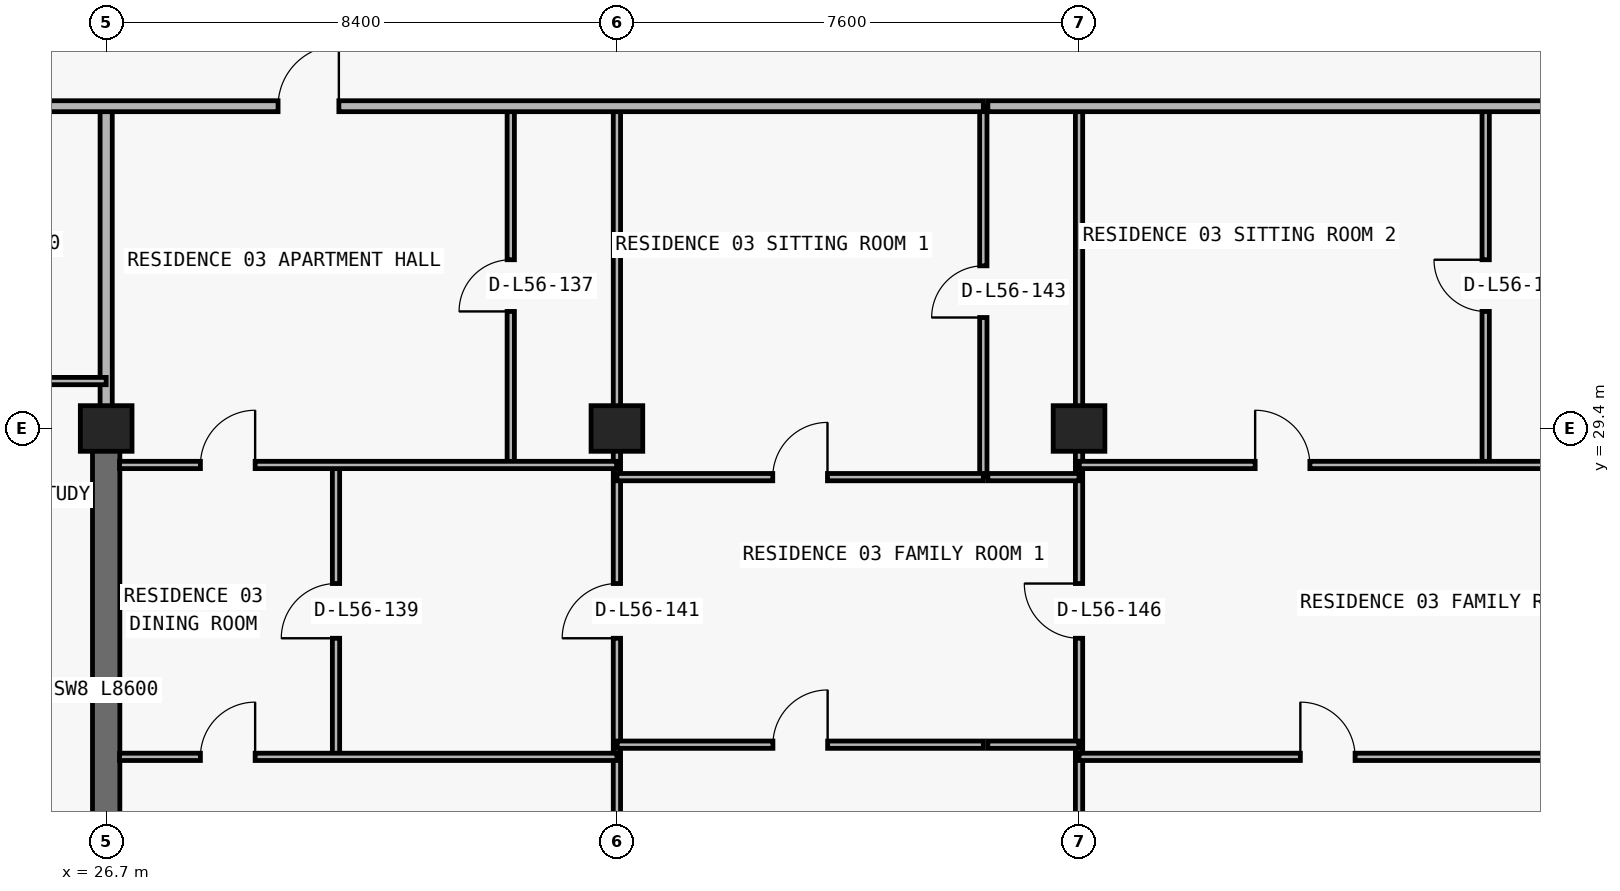
"""IFC4 building model, lengths in metres.
Left out: names, types, materials, properties, quantities, classifications, styles, units other than length and angle.
Written with IfcOpenShell. Run it as: python <this file> out.ifc"""

import sys

from ifc_helpers import new_model, si_unit, direction, frame, frame_2d, origin, origin_2d, place, context, subcontext, project, spatial, rectangle, extrude, element, fill, save


model = new_model("IFC4")
c1 = context("Model", 3, precision=1e-05, world=origin(), true_north=direction((0.0, 1.0)))
c2 = subcontext(c1, "Body", "Model", "MODEL_VIEW")
j1 = project(units=[si_unit("LENGTHUNIT", "METRE"), si_unit("PLANEANGLEUNIT", "RADIAN")], contexts=[c1])
p1 = place(None, origin())
s1 = spatial("IfcSite", under=j1, at=p1, CompositionType="ELEMENT")
p2 = place(p1, origin())
s2 = spatial("IfcBuilding", under=s1, at=p2, CompositionType="ELEMENT")
p3 = place(p2, frame((0.0, 0.0, 201.6)))
s3 = spatial("IfcBuildingStorey", under=s2, at=p3, CompositionType="ELEMENT", Elevation=201.6)
for number, where, z_axis, x_axis in (
    (1, (26.7, 29.4, 0.0), (0.0, 0.0, 1.0), (1.0, 0.0, 0.0)),
    (2, (35.1, 29.4, 0.0), (0.0, 0.0, 1.0), (1.0, 0.0, 0.0)),
    (3, (42.7, 29.4, 0.0), (0.0, 0.0, 1.0), (1.0, 0.0, 0.0)),
):
    element("IfcColumn", number, at=place(p3, frame(where, z_axis=z_axis, x_axis=x_axis)), inside=s3, PredefinedType="COLUMN", context=c2, shape_type="SweptSolid", body=[
        extrude(rectangle(XDim=0.85, YDim=0.75, at=origin_2d()), origin(), (0.0, 0.0, 1.0), 3.05),
    ])
p4 = place(p3, frame((26.7, 20.8, 0.0), z_axis=(0.0, 0.0, 1.0), x_axis=(0.0, 1.0, 0.0)))
e4 = element("IfcWall", 4, at=p4, inside=s3, PredefinedType="SHEAR", context=c2, shape_type="SweptSolid", body=[
    extrude(rectangle(XDim=8.6, YDim=0.45, at=frame_2d((4.3, 0.0))), origin(), (0.0, 0.0, 1.0), 3.05),
])
p5 = place(p3, frame((26.7, 29.405, 0.0), z_axis=(0.0, 0.0, 1.0), x_axis=(0.0, 1.0, 0.0)))
e5 = element("IfcWall", 5, at=p5, inside=s3, PredefinedType="PARTITIONING", context=c2, shape_type="SweptSolid", body=[
    extrude(rectangle(XDim=5.295, YDim=0.2, at=frame_2d((2.647, 0.0))), origin(), (0.0, 0.0, 1.0), 2.335),
])
p6 = place(p3, frame((30.48, 24.0, 0.0), z_axis=(0.0, 0.0, 1.0), x_axis=(0.0, 1.0, 0.0)))
e6 = element("IfcWall", 6, at=p6, inside=s3, PredefinedType="PARTITIONING", context=c2, shape_type="SweptSolid", body=[
    extrude(rectangle(XDim=4.8, YDim=0.12, at=frame_2d((2.4, 0.0))), origin(), (0.0, 0.0, 1.0), 3.05),
])
p7 = place(p6, frame((1.95, 0.0, 0.0)))
e7 = element("IfcOpeningElement", 7, at=p7, cuts=e6, PredefinedType="OPENING", context=c2, shape_type="SweptSolid", body=[
    extrude(rectangle(XDim=0.9, YDim=2.15, at=frame_2d((0.45, 1.075))), frame((0.0, 0.07, 0.0), z_axis=(0.0, -1.0, 0.0), x_axis=(1.0, 0.0, 0.0)), (0.0, 0.0, 1.0), 0.14),
])
p8 = place(p3, frame((33.354, 28.8, 0.0), z_axis=(0.0, 0.0, 1.0), x_axis=(0.0, 1.0, 0.0)))
e8 = element("IfcWall", 8, at=p8, inside=s3, PredefinedType="PARTITIONING", context=c2, shape_type="SweptSolid", body=[
    extrude(rectangle(XDim=5.9, YDim=0.12, at=frame_2d((2.95, 0.0))), origin(), (0.0, 0.0, 1.0), 3.05),
])
p9 = place(p8, frame((2.525, 0.0, 0.0)))
e9 = element("IfcOpeningElement", 9, at=p9, cuts=e8, PredefinedType="OPENING", context=c2, shape_type="SweptSolid", body=[
    extrude(rectangle(XDim=0.85, YDim=2.1, at=frame_2d((0.425, 1.05))), frame((0.0, 0.07, 0.0), z_axis=(0.0, -1.0, 0.0), x_axis=(1.0, 0.0, 0.0)), (0.0, 0.0, 1.0), 0.14),
])
p10 = place(p3, frame((35.1, 11.24, 0.0), z_axis=(0.0, 0.0, 1.0), x_axis=(0.0, 1.0, 0.0)))
e10 = element("IfcWall", 10, at=p10, inside=s3, PredefinedType="PARTITIONING", context=c2, shape_type="SweptSolid", body=[
    extrude(rectangle(XDim=23.46, YDim=0.12, at=frame_2d((11.73, 0.0))), origin(), (0.0, 0.0, 1.0), 2.263),
])
p11 = place(p10, frame((14.71, 0.0, 0.0)))
e11 = element("IfcOpeningElement", 11, at=p11, cuts=e10, PredefinedType="OPENING", context=c2, shape_type="SweptSolid", body=[
    extrude(rectangle(XDim=0.9, YDim=2.15, at=frame_2d((0.45, 1.075))), frame((0.0, 0.07, 0.0), z_axis=(0.0, -1.0, 0.0), x_axis=(1.0, 0.0, 0.0)), (0.0, 0.0, 1.0), 0.14),
])
p12 = place(p3, frame((41.126, 28.6, 0.0), z_axis=(0.0, 0.0, 1.0), x_axis=(0.0, 1.0, 0.0)))
e12 = element("IfcWall", 12, at=p12, inside=s3, PredefinedType="PARTITIONING", context=c2, shape_type="SweptSolid", body=[
    extrude(rectangle(XDim=6.1, YDim=0.12, at=frame_2d((3.05, 0.0))), origin(), (0.0, 0.0, 1.0), 3.05),
])
p13 = place(p12, frame((2.625, 0.0, 0.0)))
e13 = element("IfcOpeningElement", 13, at=p13, cuts=e12, PredefinedType="OPENING", context=c2, shape_type="SweptSolid", body=[
    extrude(rectangle(XDim=0.85, YDim=2.1, at=frame_2d((0.425, 1.05))), frame((0.0, 0.07, 0.0), z_axis=(0.0, -1.0, 0.0), x_axis=(1.0, 0.0, 0.0)), (0.0, 0.0, 1.0), 0.14),
])
p14 = place(p3, frame((42.7, 11.24, 0.0), z_axis=(0.0, 0.0, 1.0), x_axis=(0.0, 1.0, 0.0)))
e14 = element("IfcWall", 14, at=p14, inside=s3, PredefinedType="PARTITIONING", context=c2, shape_type="SweptSolid", body=[
    extrude(rectangle(XDim=23.46, YDim=0.12, at=frame_2d((11.73, 0.0))), origin(), (0.0, 0.0, 1.0), 2.263),
])
p15 = place(p14, frame((14.71, 0.0, 0.0)))
e15 = element("IfcOpeningElement", 15, at=p15, cuts=e14, PredefinedType="OPENING", context=c2, shape_type="SweptSolid", body=[
    extrude(rectangle(XDim=0.9, YDim=2.15, at=frame_2d((0.45, 1.075))), frame((0.0, 0.07, 0.0), z_axis=(0.0, -1.0, 0.0), x_axis=(1.0, 0.0, 0.0)), (0.0, 0.0, 1.0), 0.14),
])
p16 = place(p3, frame((49.388, 28.8, 0.0), z_axis=(0.0, 0.0, 1.0), x_axis=(0.0, 1.0, 0.0)))
e16 = element("IfcWall", 16, at=p16, inside=s3, PredefinedType="PARTITIONING", context=c2, shape_type="SweptSolid", body=[
    extrude(rectangle(XDim=5.9, YDim=0.12, at=frame_2d((2.95, 0.0))), origin(), (0.0, 0.0, 1.0), 3.05),
])
p17 = place(p16, frame((2.525, 0.0, 0.0)))
e17 = element("IfcOpeningElement", 17, at=p17, cuts=e16, PredefinedType="OPENING", context=c2, shape_type="SweptSolid", body=[
    extrude(rectangle(XDim=0.85, YDim=2.1, at=frame_2d((0.425, 1.05))), frame((0.0, 0.07, 0.0), z_axis=(0.0, -1.0, 0.0), x_axis=(1.0, 0.0, 0.0)), (0.0, 0.0, 1.0), 0.14),
])
p18 = place(p3, frame((26.92, 24.0, 0.0), z_axis=(0.0, 0.0, 1.0), x_axis=(1.0, 0.0, 0.0)))
e18 = element("IfcWall", 18, at=p18, inside=s3, PredefinedType="PARTITIONING", context=c2, shape_type="SweptSolid", body=[
    extrude(rectangle(XDim=8.18, YDim=0.12, at=frame_2d((4.09, 0.0))), origin(), (0.0, 0.0, 1.0), 3.05),
])
p19 = place(p18, frame((1.33, 0.0, 0.0)))
e19 = element("IfcOpeningElement", 19, at=p19, cuts=e18, PredefinedType="OPENING", context=c2, shape_type="SweptSolid", body=[
    extrude(rectangle(XDim=0.9, YDim=2.15, at=frame_2d((0.45, 1.075))), frame((0.0, 0.07, 0.0), z_axis=(0.0, -1.0, 0.0), x_axis=(1.0, 0.0, 0.0)), (0.0, 0.0, 1.0), 0.14),
])
p20 = place(p3, frame((42.7, 24.0, 0.0), z_axis=(0.0, 0.0, 1.0), x_axis=(1.0, 0.0, 0.0)))
e20 = element("IfcWall", 20, at=p20, inside=s3, PredefinedType="PARTITIONING", context=c2, shape_type="SweptSolid", body=[
    extrude(rectangle(XDim=8.18, YDim=0.12, at=frame_2d((4.09, 0.0))), origin(), (0.0, 0.0, 1.0), 3.05),
])
p21 = place(p20, frame((3.64, 0.0, 0.0)))
e21 = element("IfcOpeningElement", 21, at=p21, cuts=e20, PredefinedType="OPENING", context=c2, shape_type="SweptSolid", body=[
    extrude(rectangle(XDim=0.9, YDim=2.15, at=frame_2d((0.45, 1.075))), frame((0.0, 0.07, 0.0), z_axis=(0.0, -1.0, 0.0), x_axis=(1.0, 0.0, 0.0)), (0.0, 0.0, 1.0), 0.14),
])
p22 = place(p3, frame((35.105, 24.2, 0.0), z_axis=(0.0, 0.0, 1.0), x_axis=(1.0, 0.0, 0.0)))
e22 = element("IfcWall", 22, at=p22, inside=s3, PredefinedType="PARTITIONING", context=c2, shape_type="SweptSolid", body=[
    extrude(rectangle(XDim=6.021, YDim=0.12, at=frame_2d((3.01, 0.0))), origin(), (0.0, 0.0, 1.0), 3.05),
])
p23 = place(p22, frame((2.561, 0.0, 0.0)))
e23 = element("IfcOpeningElement", 23, at=p23, cuts=e22, PredefinedType="OPENING", context=c2, shape_type="SweptSolid", body=[
    extrude(rectangle(XDim=0.9, YDim=2.15, at=frame_2d((0.45, 1.075))), frame((0.0, 0.07, 0.0), z_axis=(0.0, -1.0, 0.0), x_axis=(1.0, 0.0, 0.0)), (0.0, 0.0, 1.0), 0.14),
])
p24 = place(p3, frame((41.2, 24.2, 0.0), z_axis=(0.0, 0.0, 1.0), x_axis=(1.0, 0.0, 0.0)))
e24 = element("IfcWall", 24, at=p24, inside=s3, PredefinedType="PARTITIONING", context=c2, shape_type="SweptSolid", body=[
    extrude(rectangle(XDim=1.495, YDim=0.12, at=frame_2d((0.748, 0.0))), origin(), (0.0, 0.0, 1.0), 3.05),
])
p25 = place(p3, frame((18.3, 25.03, 0.0), z_axis=(0.0, 0.0, 1.0), x_axis=(1.0, 0.0, 0.0)))
e25 = element("IfcWall", 25, at=p25, inside=s3, PredefinedType="PARTITIONING", context=c2, shape_type="SweptSolid", body=[
    extrude(rectangle(XDim=8.18, YDim=0.12, at=frame_2d((4.09, 0.0))), origin(), (0.0, 0.0, 1.0), 3.05),
])
p26 = place(p25, frame((1.693, 0.0, 0.0)))
e26 = element("IfcOpeningElement", 26, at=p26, cuts=e25, PredefinedType="OPENING", context=c2, shape_type="SweptSolid", body=[
    extrude(rectangle(XDim=0.9, YDim=2.15, at=frame_2d((0.45, 1.075))), frame((0.0, 0.07, 0.0), z_axis=(0.0, -1.0, 0.0), x_axis=(1.0, 0.0, 0.0)), (0.0, 0.0, 1.0), 0.14),
])
p27 = place(p25, frame((5.95, 0.0, 0.0)))
e27 = element("IfcOpeningElement", 27, at=p27, cuts=e25, PredefinedType="OPENING", context=c2, shape_type="SweptSolid", body=[
    extrude(rectangle(XDim=0.9, YDim=2.15, at=frame_2d((0.45, 1.075))), frame((0.0, 0.07, 0.0), z_axis=(0.0, -1.0, 0.0), x_axis=(1.0, 0.0, 0.0)), (0.0, 0.0, 1.0), 0.14),
])
p28 = place(p3, frame((35.1, 28.6, 0.0), z_axis=(0.0, 0.0, 1.0), x_axis=(1.0, 0.0, 0.0)))
e28 = element("IfcWall", 28, at=p28, inside=s3, PredefinedType="PARTITIONING", context=c2, shape_type="SweptSolid", body=[
    extrude(rectangle(XDim=6.026, YDim=0.12, at=frame_2d((3.013, 0.0))), origin(), (0.0, 0.0, 1.0), 3.05),
])
p29 = place(p28, frame((2.563, 0.0, 0.0)))
e29 = element("IfcOpeningElement", 29, at=p29, cuts=e28, PredefinedType="OPENING", context=c2, shape_type="SweptSolid", body=[
    extrude(rectangle(XDim=0.9, YDim=2.15, at=frame_2d((0.45, 1.075))), frame((0.0, 0.07, 0.0), z_axis=(0.0, -1.0, 0.0), x_axis=(1.0, 0.0, 0.0)), (0.0, 0.0, 1.0), 0.14),
])
p30 = place(p3, frame((41.2, 28.6, 0.0), z_axis=(0.0, 0.0, 1.0), x_axis=(1.0, 0.0, 0.0)))
e30 = element("IfcWall", 30, at=p30, inside=s3, PredefinedType="PARTITIONING", context=c2, shape_type="SweptSolid", body=[
    extrude(rectangle(XDim=1.5, YDim=0.12, at=frame_2d((0.75, 0.0))), origin(), (0.0, 0.0, 1.0), 3.05),
])
p31 = place(p3, frame((26.92, 28.8, 0.0), z_axis=(0.0, 0.0, 1.0), x_axis=(1.0, 0.0, 0.0)))
e31 = element("IfcWall", 31, at=p31, inside=s3, PredefinedType="PARTITIONING", context=c2, shape_type="SweptSolid", body=[
    extrude(rectangle(XDim=8.175, YDim=0.12, at=frame_2d((4.087, 0.0))), origin(), (0.0, 0.0, 1.0), 3.05),
])
p32 = place(p31, frame((1.33, 0.0, 0.0)))
e32 = element("IfcOpeningElement", 32, at=p32, cuts=e31, PredefinedType="OPENING", context=c2, shape_type="SweptSolid", body=[
    extrude(rectangle(XDim=0.9, YDim=2.15, at=frame_2d((0.45, 1.075))), frame((0.0, 0.07, 0.0), z_axis=(0.0, -1.0, 0.0), x_axis=(1.0, 0.0, 0.0)), (0.0, 0.0, 1.0), 0.14),
])
p33 = place(p3, frame((42.705, 28.8, 0.0), z_axis=(0.0, 0.0, 1.0), x_axis=(1.0, 0.0, 0.0)))
e33 = element("IfcWall", 33, at=p33, inside=s3, PredefinedType="PARTITIONING", context=c2, shape_type="SweptSolid", body=[
    extrude(rectangle(XDim=8.175, YDim=0.12, at=frame_2d((4.087, 0.0))), origin(), (0.0, 0.0, 1.0), 3.05),
])
p34 = place(p33, frame((2.892, 0.0, 0.0)))
e34 = element("IfcOpeningElement", 34, at=p34, cuts=e33, PredefinedType="OPENING", context=c2, shape_type="SweptSolid", body=[
    extrude(rectangle(XDim=0.9, YDim=2.15, at=frame_2d((0.45, 1.075))), frame((0.0, 0.07, 0.0), z_axis=(0.0, -1.0, 0.0), x_axis=(1.0, 0.0, 0.0)), (0.0, 0.0, 1.0), 0.14),
])
p35 = place(p3, frame((18.3, 30.18, 0.0), z_axis=(0.0, 0.0, 1.0), x_axis=(1.0, 0.0, 0.0)))
e35 = element("IfcWall", 35, at=p35, inside=s3, PredefinedType="PARTITIONING", context=c2, shape_type="SweptSolid", body=[
    extrude(rectangle(XDim=8.4, YDim=0.12, at=frame_2d((4.2, 0.0))), origin(), (0.0, 0.0, 1.0), 3.05),
])
p36 = place(p35, frame((1.693, 0.0, 0.0)))
e36 = element("IfcOpeningElement", 36, at=p36, cuts=e35, PredefinedType="OPENING", context=c2, shape_type="SweptSolid", body=[
    extrude(rectangle(XDim=0.9, YDim=2.15, at=frame_2d((0.45, 1.075))), frame((0.0, 0.07, 0.0), z_axis=(0.0, -1.0, 0.0), x_axis=(1.0, 0.0, 0.0)), (0.0, 0.0, 1.0), 0.14),
])
p37 = place(p3, frame((10.105, 34.7, 0.0), z_axis=(0.0, 0.0, 1.0), x_axis=(1.0, 0.0, 0.0)))
e37 = element("IfcWall", 37, at=p37, inside=s3, PredefinedType="PARTITIONING", context=c2, shape_type="SweptSolid", body=[
    extrude(rectangle(XDim=31.021, YDim=0.18, at=frame_2d((15.51, 0.0))), origin(), (0.0, 0.0, 1.0), 3.05),
])
p38 = place(p37, frame((2.365, 0.0, 0.0)))
e38 = element("IfcOpeningElement", 38, at=p38, cuts=e37, PredefinedType="OPENING", context=c2, shape_type="SweptSolid", body=[
    extrude(rectangle(XDim=1.0, YDim=2.2, at=frame_2d((0.5, 1.1))), frame((0.0, 0.1, 0.0), z_axis=(0.0, -1.0, 0.0), x_axis=(1.0, 0.0, 0.0)), (0.0, 0.0, 1.0), 0.2),
])
p39 = place(p37, frame((10.833, 0.0, 0.0)))
e39 = element("IfcOpeningElement", 39, at=p39, cuts=e37, PredefinedType="OPENING", context=c2, shape_type="SweptSolid", body=[
    extrude(rectangle(XDim=1.0, YDim=2.2, at=frame_2d((0.5, 1.1))), frame((0.0, 0.1, 0.0), z_axis=(0.0, -1.0, 0.0), x_axis=(1.0, 0.0, 0.0)), (0.0, 0.0, 1.0), 0.2),
])
p40 = place(p37, frame((19.422, 0.0, 0.0)))
e40 = element("IfcOpeningElement", 40, at=p40, cuts=e37, PredefinedType="OPENING", context=c2, shape_type="SweptSolid", body=[
    extrude(rectangle(XDim=1.0, YDim=2.2, at=frame_2d((0.5, 1.1))), frame((0.0, 0.1, 0.0), z_axis=(0.0, -1.0, 0.0), x_axis=(1.0, 0.0, 0.0)), (0.0, 0.0, 1.0), 0.2),
])
p41 = place(p3, frame((41.2, 34.7, 0.0), z_axis=(0.0, 0.0, 1.0), x_axis=(1.0, 0.0, 0.0)))
e41 = element("IfcWall", 41, at=p41, inside=s3, PredefinedType="PARTITIONING", context=c2, shape_type="SweptSolid", body=[
    extrude(rectangle(XDim=26.5, YDim=0.18, at=frame_2d((13.25, 0.0))), origin(), (0.0, 0.0, 1.0), 3.05),
])
p42 = place(p41, frame((12.77, 0.0, 0.0)))
e42 = element("IfcOpeningElement", 42, at=p42, cuts=e41, PredefinedType="OPENING", context=c2, shape_type="SweptSolid", body=[
    extrude(rectangle(XDim=1.0, YDim=2.2, at=frame_2d((0.5, 1.1))), frame((0.0, 0.1, 0.0), z_axis=(0.0, -1.0, 0.0), x_axis=(1.0, 0.0, 0.0)), (0.0, 0.0, 1.0), 0.2),
])
p43 = place(p40, origin())
e43 = element("IfcDoor", 43, at=p43, inside=s3, OperationType="SINGLE_SWING_RIGHT", PredefinedType="DOOR", context=c2, shape_type="SweptSolid", body=[
    extrude(rectangle(XDim=1.0, YDim=2.2, at=frame_2d((0.5, 1.1))), frame((0.0, 0.025, 0.0), z_axis=(0.0, -1.0, 0.0), x_axis=(1.0, 0.0, 0.0)), (0.0, 0.0, 1.0), 0.05),
])
fill(e40, e43)
p44 = place(p9, origin())
e44 = element("IfcDoor", 44, at=p44, inside=s3, OperationType="SINGLE_SWING_LEFT", PredefinedType="DOOR", context=c2, shape_type="SweptSolid", body=[
    extrude(rectangle(XDim=0.85, YDim=2.1, at=frame_2d((0.425, 1.05))), frame((0.0, 0.025, 0.0), z_axis=(0.0, -1.0, 0.0), x_axis=(1.0, 0.0, 0.0)), (0.0, 0.0, 1.0), 0.05),
])
fill(e9, e44)
p45 = place(p32, origin())
e45 = element("IfcDoor", 45, at=p45, inside=s3, OperationType="SINGLE_SWING_RIGHT", PredefinedType="DOOR", context=c2, shape_type="SweptSolid", body=[
    extrude(rectangle(XDim=0.9, YDim=2.15, at=frame_2d((0.45, 1.075))), frame((0.0, 0.025, 0.0), z_axis=(0.0, -1.0, 0.0), x_axis=(1.0, 0.0, 0.0)), (0.0, 0.0, 1.0), 0.05),
])
fill(e32, e45)
p46 = place(p7, origin())
e46 = element("IfcDoor", 46, at=p46, inside=s3, OperationType="SINGLE_SWING_LEFT", PredefinedType="DOOR", context=c2, shape_type="SweptSolid", body=[
    extrude(rectangle(XDim=0.9, YDim=2.15, at=frame_2d((0.45, 1.075))), frame((0.0, 0.025, 0.0), z_axis=(0.0, -1.0, 0.0), x_axis=(1.0, 0.0, 0.0)), (0.0, 0.0, 1.0), 0.05),
])
fill(e7, e46)
p47 = place(p19, origin())
e47 = element("IfcDoor", 47, at=p47, inside=s3, OperationType="SINGLE_SWING_RIGHT", PredefinedType="DOOR", context=c2, shape_type="SweptSolid", body=[
    extrude(rectangle(XDim=0.9, YDim=2.15, at=frame_2d((0.45, 1.075))), frame((0.0, 0.025, 0.0), z_axis=(0.0, -1.0, 0.0), x_axis=(1.0, 0.0, 0.0)), (0.0, 0.0, 1.0), 0.05),
])
fill(e19, e47)
p48 = place(p11, origin())
e48 = element("IfcDoor", 48, at=p48, inside=s3, OperationType="SINGLE_SWING_LEFT", PredefinedType="DOOR", context=c2, shape_type="SweptSolid", body=[
    extrude(rectangle(XDim=0.9, YDim=2.15, at=frame_2d((0.45, 1.075))), frame((0.0, 0.025, 0.0), z_axis=(0.0, -1.0, 0.0), x_axis=(1.0, 0.0, 0.0)), (0.0, 0.0, 1.0), 0.05),
])
fill(e11, e48)
p49 = place(p29, origin())
e49 = element("IfcDoor", 49, at=p49, inside=s3, OperationType="SINGLE_SWING_RIGHT", PredefinedType="DOOR", context=c2, shape_type="SweptSolid", body=[
    extrude(rectangle(XDim=0.9, YDim=2.15, at=frame_2d((0.45, 1.075))), frame((0.0, 0.025, 0.0), z_axis=(0.0, -1.0, 0.0), x_axis=(1.0, 0.0, 0.0)), (0.0, 0.0, 1.0), 0.05),
])
fill(e29, e49)
p50 = place(p13, origin())
e50 = element("IfcDoor", 50, at=p50, inside=s3, OperationType="SINGLE_SWING_LEFT", PredefinedType="DOOR", context=c2, shape_type="SweptSolid", body=[
    extrude(rectangle(XDim=0.85, YDim=2.1, at=frame_2d((0.425, 1.05))), frame((0.0, 0.025, 0.0), z_axis=(0.0, -1.0, 0.0), x_axis=(1.0, 0.0, 0.0)), (0.0, 0.0, 1.0), 0.05),
])
fill(e13, e50)
p51 = place(p23, origin())
e51 = element("IfcDoor", 51, at=p51, inside=s3, OperationType="SINGLE_SWING_RIGHT", PredefinedType="DOOR", context=c2, shape_type="SweptSolid", body=[
    extrude(rectangle(XDim=0.9, YDim=2.15, at=frame_2d((0.45, 1.075))), frame((0.0, 0.025, 0.0), z_axis=(0.0, -1.0, 0.0), x_axis=(1.0, 0.0, 0.0)), (0.0, 0.0, 1.0), 0.05),
])
fill(e23, e51)
p52 = place(p15, origin())
e52 = element("IfcDoor", 52, at=p52, inside=s3, OperationType="SINGLE_SWING_RIGHT", PredefinedType="DOOR", context=c2, shape_type="SweptSolid", body=[
    extrude(rectangle(XDim=0.9, YDim=2.15, at=frame_2d((0.45, 1.075))), frame((0.0, 0.025, 0.0), z_axis=(0.0, -1.0, 0.0), x_axis=(1.0, 0.0, 0.0)), (0.0, 0.0, 1.0), 0.05),
])
fill(e15, e52)
p53 = place(p34, origin())
e53 = element("IfcDoor", 53, at=p53, inside=s3, OperationType="SINGLE_SWING_LEFT", PredefinedType="DOOR", context=c2, shape_type="SweptSolid", body=[
    extrude(rectangle(XDim=0.9, YDim=2.15, at=frame_2d((0.45, 1.075))), frame((0.0, 0.025, 0.0), z_axis=(0.0, -1.0, 0.0), x_axis=(1.0, 0.0, 0.0)), (0.0, 0.0, 1.0), 0.05),
])
fill(e34, e53)
p54 = place(p17, origin())
e54 = element("IfcDoor", 54, at=p54, inside=s3, OperationType="SINGLE_SWING_RIGHT", PredefinedType="DOOR", context=c2, shape_type="SweptSolid", body=[
    extrude(rectangle(XDim=0.85, YDim=2.1, at=frame_2d((0.425, 1.05))), frame((0.0, 0.025, 0.0), z_axis=(0.0, -1.0, 0.0), x_axis=(1.0, 0.0, 0.0)), (0.0, 0.0, 1.0), 0.05),
])
fill(e17, e54)
p55 = place(p21, origin())
e55 = element("IfcDoor", 55, at=p55, inside=s3, OperationType="SINGLE_SWING_LEFT", PredefinedType="DOOR", context=c2, shape_type="SweptSolid", body=[
    extrude(rectangle(XDim=0.9, YDim=2.15, at=frame_2d((0.45, 1.075))), frame((0.0, 0.025, 0.0), z_axis=(0.0, -1.0, 0.0), x_axis=(1.0, 0.0, 0.0)), (0.0, 0.0, 1.0), 0.05),
])
fill(e21, e55)
save(model, sys.argv[1])
